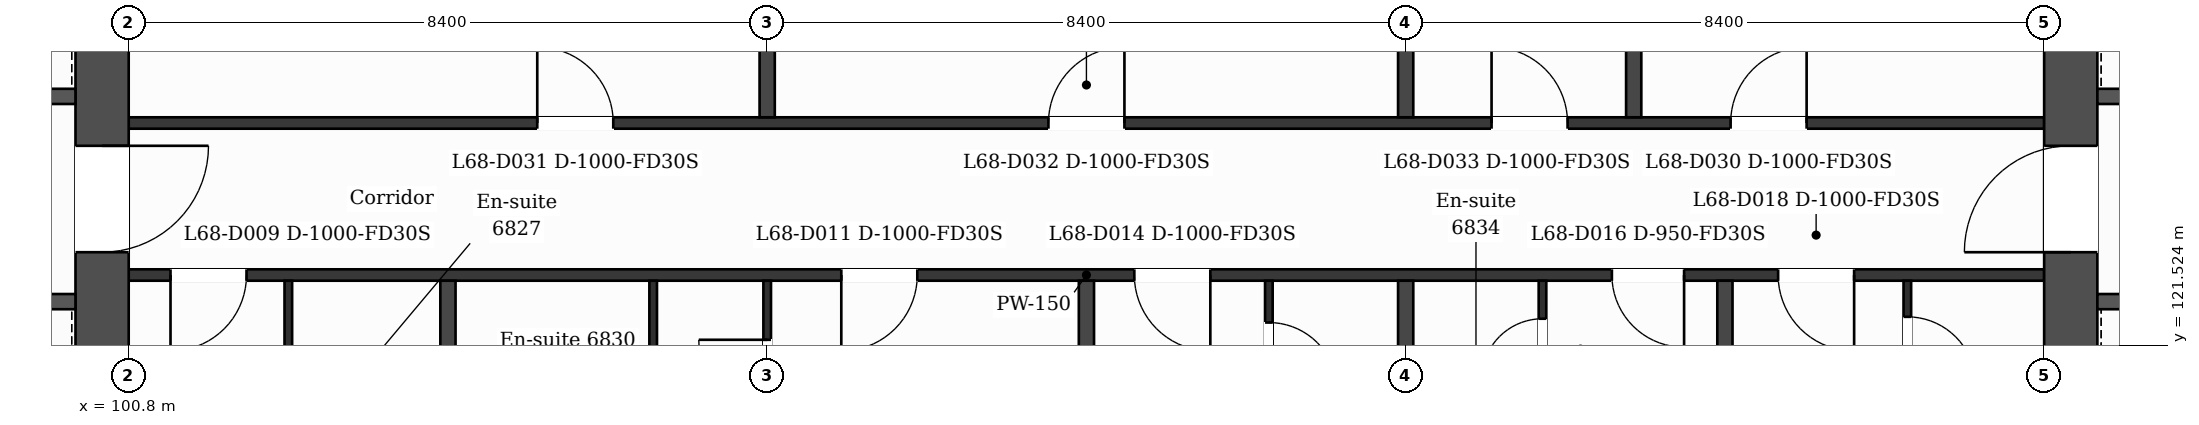
"""IFC4 building model, lengths in metres.
Left out: names, types, materials, properties, quantities, classifications, styles, units other than length and angle.
Written with IfcOpenShell. Run it as: python <this file> out.ifc"""

import sys

from ifc_helpers import new_model, si_unit, direction, frame, frame_2d, origin, place, context, subcontext, project, spatial, rectangle, extrude, element, fill, save


model = new_model("IFC4")
c1 = context("Model", 3, precision=1e-05, world=origin(), true_north=direction((0.0, 1.0)))
c2 = subcontext(c1, "Body", "Model", "MODEL_VIEW")
j1 = project(units=[si_unit("LENGTHUNIT", "METRE"), si_unit("PLANEANGLEUNIT", "RADIAN")], contexts=[c1])
p1 = place(None, origin())
s1 = spatial("IfcSite", under=j1, at=p1, CompositionType="ELEMENT")
p2 = place(p1, origin())
s2 = spatial("IfcBuilding", under=s1, at=p2, CompositionType="ELEMENT")
p3 = place(p2, frame((0.0, 0.0, 281.2)))
s3 = spatial("IfcBuildingStorey", under=s2, at=p3, CompositionType="ELEMENT", Elevation=281.2)
p4 = place(p3, frame((100.45, 132.05, 0.0), z_axis=(0.0, 0.0, 1.0), x_axis=(0.0, -1.0, 0.0)))
e1 = element("IfcWall", 1, at=p4, inside=s3, PredefinedType="SHEAR", context=c2, shape_type="SweptSolid", body=[
    extrude(rectangle(XDim=15.7, YDim=0.7, at=frame_2d((7.85, 0.0))), origin(), (0.0, 0.0, 1.0), 3.7),
])
p5 = place(p4, frame((7.9, 0.0, 0.0)))
e2 = element("IfcOpeningElement", 2, at=p5, cuts=e1, PredefinedType="OPENING", context=c2, shape_type="SweptSolid", body=[
    extrude(rectangle(XDim=1.4, YDim=2.1, at=frame_2d((0.7, 1.05))), frame((0.0, 0.36, 0.0), z_axis=(0.0, -1.0, 0.0), x_axis=(1.0, 0.0, 0.0)), (0.0, 0.0, 1.0), 0.72),
])
p6 = place(p3, frame((126.35, 116.35, 0.0), z_axis=(0.0, 0.0, 1.0), x_axis=(0.0, 1.0, 0.0)))
e3 = element("IfcWall", 3, at=p6, inside=s3, PredefinedType="SHEAR", context=c2, shape_type="SweptSolid", body=[
    extrude(rectangle(XDim=15.7, YDim=0.7, at=frame_2d((7.85, 0.0))), origin(), (0.0, 0.0, 1.0), 3.7),
])
p7 = place(p6, frame((6.4, 0.0, 0.0)))
e4 = element("IfcOpeningElement", 4, at=p7, cuts=e3, PredefinedType="OPENING", context=c2, shape_type="SweptSolid", body=[
    extrude(rectangle(XDim=1.4, YDim=2.1, at=frame_2d((0.7, 1.05))), frame((0.0, 0.36, 0.0), z_axis=(0.0, -1.0, 0.0), x_axis=(1.0, 0.0, 0.0)), (0.0, 0.0, 1.0), 0.72),
])
p8 = place(p3, frame((95.227, 122.1, 0.0), z_axis=(0.0, 0.0, 1.0), x_axis=(1.0, 0.0, 0.0)))
e5 = element("IfcWall", 5, at=p8, inside=s3, PredefinedType="PARTITIONING", context=c2, shape_type="SweptSolid", body=[
    extrude(rectangle(XDim=4.873, YDim=0.2, at=frame_2d((2.437, 0.0))), origin(), (0.0, 0.0, 1.0), 3.38),
])
p9 = place(p8, frame((0.605, 0.0, 0.0)))
e6 = element("IfcOpeningElement", 6, at=p9, cuts=e5, PredefinedType="OPENING", context=c2, shape_type="SweptSolid", body=[
    extrude(rectangle(XDim=1.1, YDim=2.1, at=frame_2d((0.55, 1.05))), frame((0.0, 0.11, 0.0), z_axis=(0.0, -1.0, 0.0), x_axis=(1.0, 0.0, 0.0)), (0.0, 0.0, 1.0), 0.22),
])
p10 = place(p8, frame((2.946, 0.0, 0.0)))
e7 = element("IfcOpeningElement", 7, at=p10, cuts=e5, PredefinedType="OPENING", context=c2, shape_type="SweptSolid", body=[
    extrude(rectangle(XDim=1.1, YDim=2.1, at=frame_2d((0.55, 1.05))), frame((0.0, 0.11, 0.0), z_axis=(0.0, -1.0, 0.0), x_axis=(1.0, 0.0, 0.0)), (0.0, 0.0, 1.0), 0.22),
])
p11 = place(p3, frame((126.7, 122.1, 0.0), z_axis=(0.0, 0.0, 1.0), x_axis=(1.0, 0.0, 0.0)))
e8 = element("IfcWall", 8, at=p11, inside=s3, PredefinedType="PARTITIONING", context=c2, shape_type="SweptSolid", body=[
    extrude(rectangle(XDim=4.873, YDim=0.2, at=frame_2d((2.437, 0.0))), origin(), (0.0, 0.0, 1.0), 3.38),
])
p12 = place(p11, frame((3.105, 0.0, 0.0)))
e9 = element("IfcOpeningElement", 9, at=p12, cuts=e8, PredefinedType="OPENING", context=c2, shape_type="SweptSolid", body=[
    extrude(rectangle(XDim=1.1, YDim=2.1, at=frame_2d((0.55, 1.05))), frame((0.0, 0.11, 0.0), z_axis=(0.0, -1.0, 0.0), x_axis=(1.0, 0.0, 0.0)), (0.0, 0.0, 1.0), 0.22),
])
p13 = place(p11, frame((0.732, 0.0, 0.0)))
e10 = element("IfcOpeningElement", 10, at=p13, cuts=e8, PredefinedType="OPENING", context=c2, shape_type="SweptSolid", body=[
    extrude(rectangle(XDim=1.1, YDim=2.1, at=frame_2d((0.55, 1.05))), frame((0.0, 0.11, 0.0), z_axis=(0.0, -1.0, 0.0), x_axis=(1.0, 0.0, 0.0)), (0.0, 0.0, 1.0), 0.22),
])
p14 = place(p3, frame((100.8, 122.45, 0.0), z_axis=(0.0, 0.0, 1.0), x_axis=(1.0, 0.0, 0.0)))
e11 = element("IfcWall", 11, at=p14, inside=s3, PredefinedType="PARTITIONING", context=c2, shape_type="SweptSolid", body=[
    extrude(rectangle(XDim=25.2, YDim=0.15, at=frame_2d((12.6, 0.0))), origin(), (0.0, 0.0, 1.0), 3.38),
])
p15 = place(p14, frame((0.55, 0.0, 0.0)))
e12 = element("IfcOpeningElement", 12, at=p15, cuts=e11, PredefinedType="OPENING", context=c2, shape_type="SweptSolid", body=[
    extrude(rectangle(XDim=1.0, YDim=2.1, at=frame_2d((0.5, 1.05))), frame((0.0, 0.085, 0.0), z_axis=(0.0, -1.0, 0.0), x_axis=(1.0, 0.0, 0.0)), (0.0, 0.0, 1.0), 0.17),
])
p16 = place(p14, frame((9.375, 0.0, 0.0)))
e13 = element("IfcOpeningElement", 13, at=p16, cuts=e11, PredefinedType="OPENING", context=c2, shape_type="SweptSolid", body=[
    extrude(rectangle(XDim=1.0, YDim=2.1, at=frame_2d((0.5, 1.05))), frame((0.0, 0.085, 0.0), z_axis=(0.0, -1.0, 0.0), x_axis=(1.0, 0.0, 0.0)), (0.0, 0.0, 1.0), 0.17),
])
p17 = place(p14, frame((13.23, 0.0, 0.0)))
e14 = element("IfcOpeningElement", 14, at=p17, cuts=e11, PredefinedType="OPENING", context=c2, shape_type="SweptSolid", body=[
    extrude(rectangle(XDim=1.0, YDim=2.1, at=frame_2d((0.5, 1.05))), frame((0.0, 0.085, 0.0), z_axis=(0.0, -1.0, 0.0), x_axis=(1.0, 0.0, 0.0)), (0.0, 0.0, 1.0), 0.17),
])
p18 = place(p14, frame((19.513, 0.0, 0.0)))
e15 = element("IfcOpeningElement", 15, at=p18, cuts=e11, PredefinedType="OPENING", context=c2, shape_type="SweptSolid", body=[
    extrude(rectangle(XDim=0.95, YDim=2.1, at=frame_2d((0.475, 1.05))), frame((0.0, 0.085, 0.0), z_axis=(0.0, -1.0, 0.0), x_axis=(1.0, 0.0, 0.0)), (0.0, 0.0, 1.0), 0.17),
])
p19 = place(p14, frame((21.7, 0.0, 0.0)))
e16 = element("IfcOpeningElement", 16, at=p19, cuts=e11, PredefinedType="OPENING", context=c2, shape_type="SweptSolid", body=[
    extrude(rectangle(XDim=1.0, YDim=2.1, at=frame_2d((0.5, 1.05))), frame((0.0, 0.085, 0.0), z_axis=(0.0, -1.0, 0.0), x_axis=(1.0, 0.0, 0.0)), (0.0, 0.0, 1.0), 0.17),
])
p20 = place(p3, frame((100.8, 124.45, 0.0), z_axis=(0.0, 0.0, 1.0), x_axis=(1.0, 0.0, 0.0)))
e17 = element("IfcWall", 17, at=p20, inside=s3, PredefinedType="PARTITIONING", context=c2, shape_type="SweptSolid", body=[
    extrude(rectangle(XDim=25.2, YDim=0.15, at=frame_2d((12.6, 0.0))), origin(), (0.0, 0.0, 1.0), 3.38),
])
p21 = place(p20, frame((21.075, 0.0, 0.0)))
e18 = element("IfcOpeningElement", 18, at=p21, cuts=e17, PredefinedType="OPENING", context=c2, shape_type="SweptSolid", body=[
    extrude(rectangle(XDim=1.0, YDim=2.1, at=frame_2d((0.5, 1.05))), frame((0.0, 0.085, 0.0), z_axis=(0.0, -1.0, 0.0), x_axis=(1.0, 0.0, 0.0)), (0.0, 0.0, 1.0), 0.17),
])
p22 = place(p20, frame((5.375, 0.0, 0.0)))
e19 = element("IfcOpeningElement", 19, at=p22, cuts=e17, PredefinedType="OPENING", context=c2, shape_type="SweptSolid", body=[
    extrude(rectangle(XDim=1.0, YDim=2.1, at=frame_2d((0.5, 1.05))), frame((0.0, 0.085, 0.0), z_axis=(0.0, -1.0, 0.0), x_axis=(1.0, 0.0, 0.0)), (0.0, 0.0, 1.0), 0.17),
])
p23 = place(p20, frame((12.1, 0.0, 0.0)))
e20 = element("IfcOpeningElement", 20, at=p23, cuts=e17, PredefinedType="OPENING", context=c2, shape_type="SweptSolid", body=[
    extrude(rectangle(XDim=1.0, YDim=2.1, at=frame_2d((0.5, 1.05))), frame((0.0, 0.085, 0.0), z_axis=(0.0, -1.0, 0.0), x_axis=(1.0, 0.0, 0.0)), (0.0, 0.0, 1.0), 0.17),
])
p24 = place(p20, frame((17.93, 0.0, 0.0)))
e21 = element("IfcOpeningElement", 21, at=p24, cuts=e17, PredefinedType="OPENING", context=c2, shape_type="SweptSolid", body=[
    extrude(rectangle(XDim=1.0, YDim=2.1, at=frame_2d((0.5, 1.05))), frame((0.0, 0.085, 0.0), z_axis=(0.0, -1.0, 0.0), x_axis=(1.0, 0.0, 0.0)), (0.0, 0.0, 1.0), 0.17),
])
p25 = place(p3, frame((92.702, 124.8, 0.0), z_axis=(0.0, 0.0, 1.0), x_axis=(1.0, 0.0, 0.0)))
e22 = element("IfcWall", 22, at=p25, inside=s3, PredefinedType="PARTITIONING", context=c2, shape_type="SweptSolid", body=[
    extrude(rectangle(XDim=7.398, YDim=0.2, at=frame_2d((3.699, 0.0))), origin(), (0.0, 0.0, 1.0), 3.38),
])
p26 = place(p25, frame((5.573, 0.0, 0.0)))
e23 = element("IfcOpeningElement", 23, at=p26, cuts=e22, PredefinedType="OPENING", context=c2, shape_type="SweptSolid", body=[
    extrude(rectangle(XDim=1.1, YDim=2.1, at=frame_2d((0.55, 1.05))), frame((0.0, 0.11, 0.0), z_axis=(0.0, -1.0, 0.0), x_axis=(1.0, 0.0, 0.0)), (0.0, 0.0, 1.0), 0.22),
])
p27 = place(p3, frame((126.7, 124.8, 0.0), z_axis=(0.0, 0.0, 1.0), x_axis=(1.0, 0.0, 0.0)))
e24 = element("IfcWall", 24, at=p27, inside=s3, PredefinedType="PARTITIONING", context=c2, shape_type="SweptSolid", body=[
    extrude(rectangle(XDim=4.849, YDim=0.2, at=frame_2d((2.424, 0.0))), origin(), (0.0, 0.0, 1.0), 3.38),
])
p28 = place(p27, frame((0.725, 0.0, 0.0)))
e25 = element("IfcOpeningElement", 25, at=p28, cuts=e24, PredefinedType="OPENING", context=c2, shape_type="SweptSolid", body=[
    extrude(rectangle(XDim=1.1, YDim=2.1, at=frame_2d((0.55, 1.05))), frame((0.0, 0.11, 0.0), z_axis=(0.0, -1.0, 0.0), x_axis=(1.0, 0.0, 0.0)), (0.0, 0.0, 1.0), 0.22),
])
p29 = place(p3, frame((102.9, 120.1, 0.0), z_axis=(0.0, 0.0, 1.0), x_axis=(0.0, 1.0, 0.0)))
e26 = element("IfcWall", 26, at=p29, inside=s3, PredefinedType="PARTITIONING", context=c2, shape_type="SweptSolid", body=[
    extrude(rectangle(XDim=2.275, YDim=0.1, at=frame_2d((1.137, 0.0))), origin(), (0.0, 0.0, 1.0), 3.38),
])
p30 = place(p29, frame((0.5, 0.0, 0.0)))
e27 = element("IfcOpeningElement", 27, at=p30, cuts=e26, PredefinedType="OPENING", context=c2, shape_type="SweptSolid", body=[
    extrude(rectangle(XDim=0.9, YDim=2.1, at=frame_2d((0.45, 1.05))), frame((0.0, 0.06, 0.0), z_axis=(0.0, -1.0, 0.0), x_axis=(1.0, 0.0, 0.0)), (0.0, 0.0, 1.0), 0.12),
])
p31 = place(p3, frame((105.0, 117.79, 0.0), z_axis=(0.0, 0.0, 1.0), x_axis=(0.0, 1.0, 0.0)))
e28 = element("IfcWall", 28, at=p31, inside=s3, PredefinedType="PARTITIONING", context=c2, shape_type="SweptSolid", body=[
    extrude(rectangle(XDim=4.585, YDim=0.2, at=frame_2d((2.292, 0.0))), origin(), (0.0, 0.0, 1.0), 3.38),
])
p32 = place(p3, frame((107.7, 120.1, 0.0), z_axis=(0.0, 0.0, 1.0), x_axis=(0.0, 1.0, 0.0)))
e29 = element("IfcWall", 29, at=p32, inside=s3, PredefinedType="PARTITIONING", context=c2, shape_type="SweptSolid", body=[
    extrude(rectangle(XDim=2.275, YDim=0.1, at=frame_2d((1.137, 0.0))), origin(), (0.0, 0.0, 1.0), 3.38),
])
p33 = place(p3, frame((109.2, 117.79, 0.0), z_axis=(0.0, 0.0, 1.0), x_axis=(0.0, 1.0, 0.0)))
e30 = element("IfcWall", 30, at=p33, inside=s3, PredefinedType="PARTITIONING", context=c2, shape_type="SweptSolid", body=[
    extrude(rectangle(XDim=4.585, YDim=0.1, at=frame_2d((2.292, 0.0))), origin(), (0.0, 0.0, 1.0), 3.38),
])
p34 = place(p33, frame((2.908, 0.0, 0.0)))
e31 = element("IfcOpeningElement", 31, at=p34, cuts=e30, PredefinedType="OPENING", context=c2, shape_type="SweptSolid", body=[
    extrude(rectangle(XDim=0.9, YDim=2.1, at=frame_2d((0.45, 1.05))), frame((0.0, 0.06, 0.0), z_axis=(0.0, -1.0, 0.0), x_axis=(1.0, 0.0, 0.0)), (0.0, 0.0, 1.0), 0.12),
])
p35 = place(p3, frame((109.2, 124.525, 0.0), z_axis=(0.0, 0.0, 1.0), x_axis=(0.0, 1.0, 0.0)))
e32 = element("IfcWall", 32, at=p35, inside=s3, PredefinedType="PARTITIONING", context=c2, shape_type="SweptSolid", body=[
    extrude(rectangle(XDim=9.2, YDim=0.2, at=frame_2d((4.6, 0.0))), origin(), (0.0, 0.0, 1.0), 3.38),
])
p36 = place(p3, frame((113.4, 117.79, 0.0), z_axis=(0.0, 0.0, 1.0), x_axis=(0.0, 1.0, 0.0)))
e33 = element("IfcWall", 33, at=p36, inside=s3, PredefinedType="PARTITIONING", context=c2, shape_type="SweptSolid", body=[
    extrude(rectangle(XDim=4.585, YDim=0.2, at=frame_2d((2.292, 0.0))), origin(), (0.0, 0.0, 1.0), 3.38),
])
p37 = place(p3, frame((115.8, 119.8, 0.0), z_axis=(0.0, 0.0, 1.0), x_axis=(0.0, 1.0, 0.0)))
e34 = element("IfcWall", 34, at=p37, inside=s3, PredefinedType="PARTITIONING", context=c2, shape_type="SweptSolid", body=[
    extrude(rectangle(XDim=2.575, YDim=0.1, at=frame_2d((1.288, 0.0))), origin(), (0.0, 0.0, 1.0), 3.38),
])
p38 = place(p37, frame((1.125, 0.0, 0.0)))
e35 = element("IfcOpeningElement", 35, at=p38, cuts=e34, PredefinedType="OPENING", context=c2, shape_type="SweptSolid", body=[
    extrude(rectangle(XDim=0.9, YDim=2.1, at=frame_2d((0.45, 1.05))), frame((0.0, 0.06, 0.0), z_axis=(0.0, -1.0, 0.0), x_axis=(1.0, 0.0, 0.0)), (0.0, 0.0, 1.0), 0.12),
])
p39 = place(p3, frame((117.6, 117.79, 0.0), z_axis=(0.0, 0.0, 1.0), x_axis=(0.0, 1.0, 0.0)))
e36 = element("IfcWall", 36, at=p39, inside=s3, PredefinedType="PARTITIONING", context=c2, shape_type="SweptSolid", body=[
    extrude(rectangle(XDim=4.585, YDim=0.2, at=frame_2d((2.292, 0.0))), origin(), (0.0, 0.0, 1.0), 3.38),
])
p40 = place(p3, frame((117.6, 124.525, 0.0), z_axis=(0.0, 0.0, 1.0), x_axis=(0.0, 1.0, 0.0)))
e37 = element("IfcWall", 37, at=p40, inside=s3, PredefinedType="PARTITIONING", context=c2, shape_type="SweptSolid", body=[
    extrude(rectangle(XDim=9.2, YDim=0.2, at=frame_2d((4.6, 0.0))), origin(), (0.0, 0.0, 1.0), 3.38),
])
p41 = place(p3, frame((119.4, 120.1, 0.0), z_axis=(0.0, 0.0, 1.0), x_axis=(0.0, 1.0, 0.0)))
e38 = element("IfcWall", 38, at=p41, inside=s3, PredefinedType="PARTITIONING", context=c2, shape_type="SweptSolid", body=[
    extrude(rectangle(XDim=2.275, YDim=0.1, at=frame_2d((1.137, 0.0))), origin(), (0.0, 0.0, 1.0), 3.38),
])
p42 = place(p41, frame((0.975, 0.0, 0.0)))
e39 = element("IfcOpeningElement", 39, at=p42, cuts=e38, PredefinedType="OPENING", context=c2, shape_type="SweptSolid", body=[
    extrude(rectangle(XDim=0.8, YDim=2.1, at=frame_2d((0.4, 1.05))), frame((0.0, 0.06, 0.0), z_axis=(0.0, -1.0, 0.0), x_axis=(1.0, 0.0, 0.0)), (0.0, 0.0, 1.0), 0.12),
])
p43 = place(p3, frame((120.6, 124.525, 0.0), z_axis=(0.0, 0.0, 1.0), x_axis=(0.0, 1.0, 0.0)))
e40 = element("IfcWall", 40, at=p43, inside=s3, PredefinedType="PARTITIONING", context=c2, shape_type="SweptSolid", body=[
    extrude(rectangle(XDim=5.825, YDim=0.2, at=frame_2d((2.913, 0.0))), origin(), (0.0, 0.0, 1.0), 3.38),
])
p44 = place(p3, frame((121.8, 117.79, 0.0), z_axis=(0.0, 0.0, 1.0), x_axis=(0.0, 1.0, 0.0)))
e41 = element("IfcWall", 41, at=p44, inside=s3, PredefinedType="PARTITIONING", context=c2, shape_type="SweptSolid", body=[
    extrude(rectangle(XDim=4.585, YDim=0.2, at=frame_2d((2.292, 0.0))), origin(), (0.0, 0.0, 1.0), 3.38),
])
p45 = place(p3, frame((124.2, 120.1, 0.0), z_axis=(0.0, 0.0, 1.0), x_axis=(0.0, 1.0, 0.0)))
e42 = element("IfcWall", 42, at=p45, inside=s3, PredefinedType="PARTITIONING", context=c2, shape_type="SweptSolid", body=[
    extrude(rectangle(XDim=2.275, YDim=0.1, at=frame_2d((1.137, 0.0))), origin(), (0.0, 0.0, 1.0), 3.38),
])
p46 = place(p45, frame((0.9, 0.0, 0.0)))
e43 = element("IfcOpeningElement", 43, at=p46, cuts=e42, PredefinedType="OPENING", context=c2, shape_type="SweptSolid", body=[
    extrude(rectangle(XDim=0.9, YDim=2.1, at=frame_2d((0.45, 1.05))), frame((0.0, 0.06, 0.0), z_axis=(0.0, -1.0, 0.0), x_axis=(1.0, 0.0, 0.0)), (0.0, 0.0, 1.0), 0.12),
])
p47 = place(p15, origin())
e44 = element("IfcDoor", 44, at=p47, inside=s3, OperationType="SINGLE_SWING_LEFT", PredefinedType="DOOR", context=c2, shape_type="SweptSolid", body=[
    extrude(rectangle(XDim=1.0, YDim=2.1, at=frame_2d((0.5, 1.05))), frame((0.0, 0.025, 0.0), z_axis=(0.0, -1.0, 0.0), x_axis=(1.0, 0.0, 0.0)), (0.0, 0.0, 1.0), 0.05),
])
fill(e12, e44)
p48 = place(p16, origin())
e45 = element("IfcDoor", 45, at=p48, inside=s3, OperationType="SINGLE_SWING_LEFT", PredefinedType="DOOR", context=c2, shape_type="SweptSolid", body=[
    extrude(rectangle(XDim=1.0, YDim=2.1, at=frame_2d((0.5, 1.05))), frame((0.0, 0.025, 0.0), z_axis=(0.0, -1.0, 0.0), x_axis=(1.0, 0.0, 0.0)), (0.0, 0.0, 1.0), 0.05),
])
fill(e13, e45)
p49 = place(p34, origin())
e46 = element("IfcDoor", 46, at=p49, inside=s3, OperationType="SINGLE_SWING_RIGHT", PredefinedType="DOOR", context=c2, shape_type="SweptSolid", body=[
    extrude(rectangle(XDim=0.9, YDim=2.1, at=frame_2d((0.45, 1.05))), frame((0.0, 0.025, 0.0), z_axis=(0.0, -1.0, 0.0), x_axis=(1.0, 0.0, 0.0)), (0.0, 0.0, 1.0), 0.05),
])
fill(e31, e46)
p50 = place(p17, origin())
e47 = element("IfcDoor", 47, at=p50, inside=s3, OperationType="SINGLE_SWING_RIGHT", PredefinedType="DOOR", context=c2, shape_type="SweptSolid", body=[
    extrude(rectangle(XDim=1.0, YDim=2.1, at=frame_2d((0.5, 1.05))), frame((0.0, 0.025, 0.0), z_axis=(0.0, -1.0, 0.0), x_axis=(1.0, 0.0, 0.0)), (0.0, 0.0, 1.0), 0.05),
])
fill(e14, e47)
p51 = place(p38, origin())
e48 = element("IfcDoor", 48, at=p51, inside=s3, OperationType="SINGLE_SWING_LEFT", PredefinedType="DOOR", context=c2, shape_type="SweptSolid", body=[
    extrude(rectangle(XDim=0.9, YDim=2.1, at=frame_2d((0.45, 1.05))), frame((0.0, 0.025, 0.0), z_axis=(0.0, -1.0, 0.0), x_axis=(1.0, 0.0, 0.0)), (0.0, 0.0, 1.0), 0.05),
])
fill(e35, e48)
p52 = place(p18, origin())
e49 = element("IfcDoor", 49, at=p52, inside=s3, OperationType="SINGLE_SWING_RIGHT", PredefinedType="DOOR", context=c2, shape_type="SweptSolid", body=[
    extrude(rectangle(XDim=0.95, YDim=2.1, at=frame_2d((0.475, 1.05))), frame((0.0, 0.025, 0.0), z_axis=(0.0, -1.0, 0.0), x_axis=(1.0, 0.0, 0.0)), (0.0, 0.0, 1.0), 0.05),
])
fill(e15, e49)
p53 = place(p42, origin())
e50 = element("IfcDoor", 50, at=p53, inside=s3, OperationType="SINGLE_SWING_LEFT", PredefinedType="DOOR", context=c2, shape_type="SweptSolid", body=[
    extrude(rectangle(XDim=0.8, YDim=2.1, at=frame_2d((0.4, 1.05))), frame((0.0, 0.025, 0.0), z_axis=(0.0, -1.0, 0.0), x_axis=(1.0, 0.0, 0.0)), (0.0, 0.0, 1.0), 0.05),
])
fill(e39, e50)
p54 = place(p19, origin())
e51 = element("IfcDoor", 51, at=p54, inside=s3, OperationType="SINGLE_SWING_RIGHT", PredefinedType="DOOR", context=c2, shape_type="SweptSolid", body=[
    extrude(rectangle(XDim=1.0, YDim=2.1, at=frame_2d((0.5, 1.05))), frame((0.0, 0.025, 0.0), z_axis=(0.0, -1.0, 0.0), x_axis=(1.0, 0.0, 0.0)), (0.0, 0.0, 1.0), 0.05),
])
fill(e16, e51)
p55 = place(p46, origin())
e52 = element("IfcDoor", 52, at=p55, inside=s3, OperationType="SINGLE_SWING_LEFT", PredefinedType="DOOR", context=c2, shape_type="SweptSolid", body=[
    extrude(rectangle(XDim=0.9, YDim=2.1, at=frame_2d((0.45, 1.05))), frame((0.0, 0.025, 0.0), z_axis=(0.0, -1.0, 0.0), x_axis=(1.0, 0.0, 0.0)), (0.0, 0.0, 1.0), 0.05),
])
fill(e43, e52)
p56 = place(p21, origin())
e53 = element("IfcDoor", 53, at=p56, inside=s3, OperationType="SINGLE_SWING_RIGHT", PredefinedType="DOOR", context=c2, shape_type="SweptSolid", body=[
    extrude(rectangle(XDim=1.0, YDim=2.1, at=frame_2d((0.5, 1.05))), frame((0.0, 0.025, 0.0), z_axis=(0.0, -1.0, 0.0), x_axis=(1.0, 0.0, 0.0)), (0.0, 0.0, 1.0), 0.05),
])
fill(e18, e53)
p57 = place(p22, origin())
e54 = element("IfcDoor", 54, at=p57, inside=s3, OperationType="SINGLE_SWING_LEFT", PredefinedType="DOOR", context=c2, shape_type="SweptSolid", body=[
    extrude(rectangle(XDim=1.0, YDim=2.1, at=frame_2d((0.5, 1.05))), frame((0.0, 0.025, 0.0), z_axis=(0.0, -1.0, 0.0), x_axis=(1.0, 0.0, 0.0)), (0.0, 0.0, 1.0), 0.05),
])
fill(e19, e54)
p58 = place(p23, origin())
e55 = element("IfcDoor", 55, at=p58, inside=s3, OperationType="SINGLE_SWING_RIGHT", PredefinedType="DOOR", context=c2, shape_type="SweptSolid", body=[
    extrude(rectangle(XDim=1.0, YDim=2.1, at=frame_2d((0.5, 1.05))), frame((0.0, 0.025, 0.0), z_axis=(0.0, -1.0, 0.0), x_axis=(1.0, 0.0, 0.0)), (0.0, 0.0, 1.0), 0.05),
])
fill(e20, e55)
p59 = place(p24, origin())
e56 = element("IfcDoor", 56, at=p59, inside=s3, OperationType="SINGLE_SWING_LEFT", PredefinedType="DOOR", context=c2, shape_type="SweptSolid", body=[
    extrude(rectangle(XDim=1.0, YDim=2.1, at=frame_2d((0.5, 1.05))), frame((0.0, 0.025, 0.0), z_axis=(0.0, -1.0, 0.0), x_axis=(1.0, 0.0, 0.0)), (0.0, 0.0, 1.0), 0.05),
])
fill(e21, e56)
p60 = place(p5, origin())
e57 = element("IfcDoor", 57, at=p60, inside=s3, OperationType="SINGLE_SWING_LEFT", PredefinedType="DOOR", context=c2, shape_type="SweptSolid", body=[
    extrude(rectangle(XDim=1.4, YDim=2.1, at=frame_2d((0.7, 1.05))), frame((0.0, 0.025, 0.0), z_axis=(0.0, -1.0, 0.0), x_axis=(1.0, 0.0, 0.0)), (0.0, 0.0, 1.0), 0.05),
])
fill(e2, e57)
p61 = place(p7, origin())
e58 = element("IfcDoor", 58, at=p61, inside=s3, OperationType="SINGLE_SWING_LEFT", PredefinedType="DOOR", context=c2, shape_type="SweptSolid", body=[
    extrude(rectangle(XDim=1.4, YDim=2.1, at=frame_2d((0.7, 1.05))), frame((0.0, 0.025, 0.0), z_axis=(0.0, -1.0, 0.0), x_axis=(1.0, 0.0, 0.0)), (0.0, 0.0, 1.0), 0.05),
])
fill(e4, e58)
save(model, sys.argv[1])
